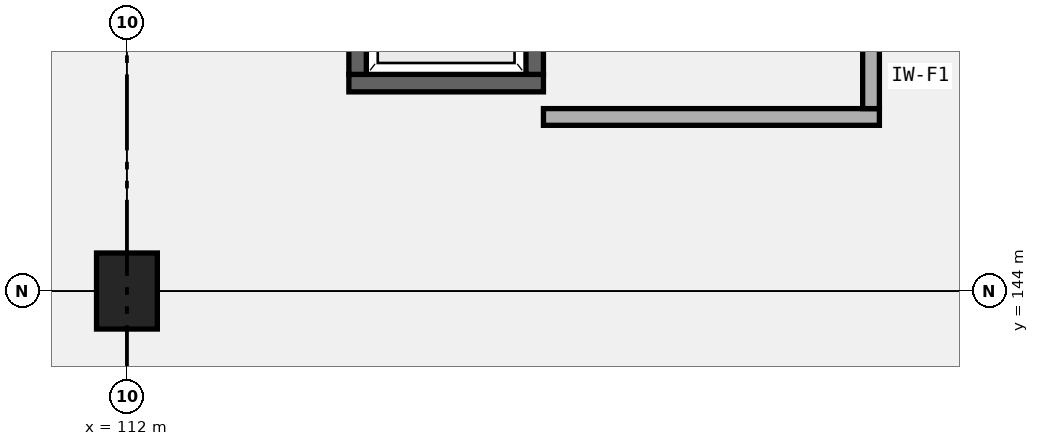
"""IFC4 building model, lengths in metres.
Left out: names, types, materials, properties, quantities, classifications, styles, units other than length and angle.
Written with IfcOpenShell. Run it as: python <this file> out.ifc"""

import sys

from ifc_helpers import new_model, si_unit, direction, frame, frame_2d, origin, origin_2d, place, context, subcontext, project, spatial, rectangle, extrude, element, save


model = new_model("IFC4")
c1 = context("Model", 3, precision=1e-05, world=origin(), true_north=direction((0.0, 1.0)))
c2 = subcontext(c1, "Body", "Model", "MODEL_VIEW")
j1 = project(units=[si_unit("LENGTHUNIT", "METRE"), si_unit("PLANEANGLEUNIT", "RADIAN")], contexts=[c1])
p1 = place(None, origin())
s1 = spatial("IfcSite", under=j1, at=p1, CompositionType="ELEMENT")
p2 = place(p1, origin())
s2 = spatial("IfcBuilding", under=s1, at=p2, CompositionType="ELEMENT")
p3 = place(p2, frame((0.0, 0.0, 5.4)))
s3 = spatial("IfcBuildingStorey", under=s2, at=p3, CompositionType="ELEMENT", Elevation=5.4)
p4 = place(p3, frame((112.0, 144.0, 0.0), z_axis=(0.0, 0.0, 1.0), x_axis=(1.0, 0.0, 0.0)))
e1 = element("IfcColumn", 1, at=p4, inside=s3, PredefinedType="COLUMN", context=c2, shape_type="SweptSolid", body=[
    extrude(rectangle(XDim=0.8, YDim=1.0, at=origin_2d()), origin(), (0.0, 0.0, 1.0), 4.8),
])
p5 = place(p3, frame((114.92, 146.735, 0.0), z_axis=(0.0, 0.0, 1.0), x_axis=(1.0, 0.0, 0.0)))
e2 = element("IfcWall", 2, at=p5, inside=s3, PredefinedType="SHEAR", context=c2, shape_type="SweptSolid", body=[
    extrude(rectangle(XDim=2.56, YDim=0.23, at=frame_2d((1.28, 0.0))), origin(), (0.0, 0.0, 1.0), 4.55),
])
p6 = place(p3, frame((115.035, 146.85, 0.0), z_axis=(0.0, 0.0, 1.0), x_axis=(0.0, 1.0, 0.0)))
e3 = element("IfcWall", 3, at=p6, inside=s3, PredefinedType="SHEAR", context=c2, shape_type="SweptSolid", body=[
    extrude(rectangle(XDim=2.7, YDim=0.23, at=frame_2d((1.35, 0.0))), origin(), (0.0, 0.0, 1.0), 4.55),
])
p7 = place(p3, frame((117.365, 146.85, 0.0), z_axis=(0.0, 0.0, 1.0), x_axis=(0.0, 1.0, 0.0)))
e4 = element("IfcWall", 4, at=p7, inside=s3, PredefinedType="SHEAR", context=c2, shape_type="SweptSolid", body=[
    extrude(rectangle(XDim=2.7, YDim=0.23, at=frame_2d((1.35, 0.0))), origin(), (0.0, 0.0, 1.0), 4.55),
])
p8 = place(p7, frame((0.8, 0.0, 0.0)))
e5 = element("IfcOpeningElement", 5, at=p8, cuts=e4, PredefinedType="OPENING", context=c2, shape_type="SweptSolid", body=[
    extrude(rectangle(XDim=1.1, YDim=2.15, at=frame_2d((0.55, 1.075))), frame((0.0, 0.125, 0.0), z_axis=(0.0, -1.0, 0.0), x_axis=(1.0, 0.0, 0.0)), (0.0, 0.0, 1.0), 0.25),
])
p9 = place(p3, frame((117.48, 146.29, 0.0), z_axis=(0.0, 0.0, 1.0), x_axis=(1.0, 0.0, 0.0)))
e6 = element("IfcWall", 6, at=p9, inside=s3, PredefinedType="SOLIDWALL", context=c2, shape_type="SweptSolid", body=[
    extrude(rectangle(XDim=4.42, YDim=0.22, at=frame_2d((2.21, 0.0))), origin(), (0.0, 0.0, 1.0), 3.92),
])
p10 = place(p3, frame((121.79, 146.4, 0.0), z_axis=(0.0, 0.0, 1.0), x_axis=(0.0, 1.0, 0.0)))
e7 = element("IfcWall", 7, at=p10, inside=s3, PredefinedType="SOLIDWALL", context=c2, shape_type="SweptSolid", body=[
    extrude(rectangle(XDim=3.6, YDim=0.22, at=frame_2d((1.8, 0.0))), origin(), (0.0, 0.0, 1.0), 3.92),
])
p11 = place(p10, frame((1.15, 0.0, 0.0)))
e8 = element("IfcOpeningElement", 8, at=p11, cuts=e7, PredefinedType="OPENING", context=c2, shape_type="SweptSolid", body=[
    extrude(rectangle(XDim=1.3, YDim=2.15, at=frame_2d((0.65, 1.075))), frame((0.0, 0.12, 0.0), z_axis=(0.0, -1.0, 0.0), x_axis=(1.0, 0.0, 0.0)), (0.0, 0.0, 1.0), 0.24),
])
save(model, sys.argv[1])
